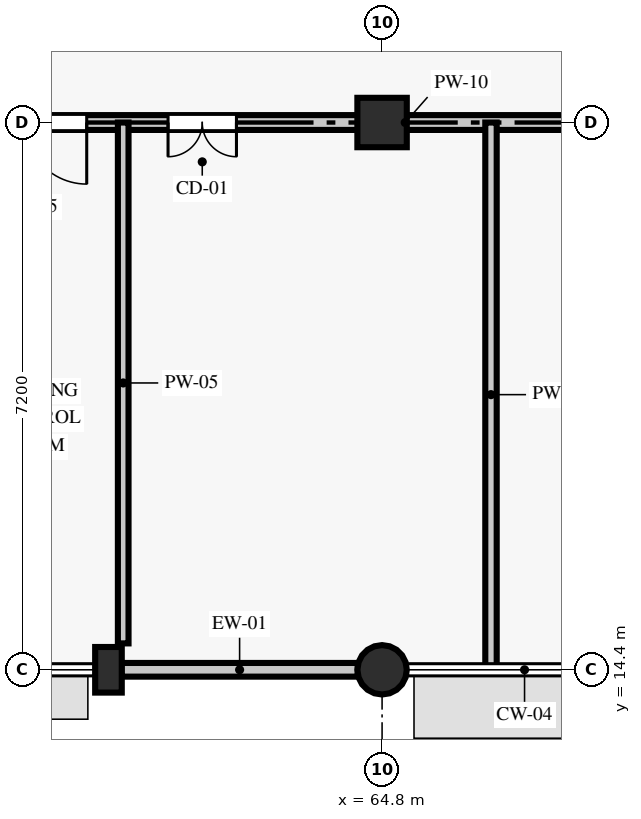
"""IFC4 building model, lengths in metres.
Left out: names, types, materials, properties, quantities, classifications, styles, units other than length and angle.
Written with IfcOpenShell. Run it as: python <this file> out.ifc"""

import sys

from ifc_helpers import new_model, si_unit, direction, frame, frame_2d, origin, origin_2d, place, context, subcontext, project, spatial, rectangle, circle, extrude, element, fill, save


model = new_model("IFC4")
c1 = context("Model", 3, precision=1e-05, world=origin(), true_north=direction((0.0, 1.0)))
c2 = subcontext(c1, "Body", "Model", "MODEL_VIEW")
j1 = project(units=[si_unit("LENGTHUNIT", "METRE"), si_unit("PLANEANGLEUNIT", "RADIAN")], contexts=[c1])
p1 = place(None, origin())
s1 = spatial("IfcSite", under=j1, at=p1, CompositionType="ELEMENT")
p2 = place(p1, origin())
s2 = spatial("IfcBuilding", under=s1, at=p2, CompositionType="ELEMENT")
p3 = place(p2, frame((0.0, 0.0, 4.8)))
s3 = spatial("IfcBuildingStorey", under=s2, at=p3, CompositionType="ELEMENT", Elevation=4.8)
p4 = place(p3, frame((64.8, 14.4, 0.0), z_axis=(0.0, 0.0, 1.0), x_axis=(1.0, 0.0, 0.0)))
e1 = element("IfcColumn", 1, at=p4, inside=s3, PredefinedType="COLUMN", context=c2, shape_type="SweptSolid", body=[
    extrude(circle(Radius=0.325, at=origin_2d()), origin(), (0.0, 0.0, 1.0), 4.505),
])
p5 = place(p3, frame((64.8, 21.6, 0.0), z_axis=(0.0, 0.0, 1.0), x_axis=(1.0, 0.0, 0.0)))
e2 = element("IfcColumn", 2, at=p5, inside=s3, PredefinedType="COLUMN", context=c2, shape_type="SweptSolid", body=[
    extrude(rectangle(XDim=0.65, YDim=0.65, at=origin_2d()), origin(), (0.0, 0.0, 1.0), 4.505),
])
p6 = place(p3, frame((61.2, 14.4, 0.0), z_axis=(0.0, 0.0, 1.0), x_axis=(1.0, 0.0, 0.0)))
e3 = element("IfcColumn", 3, at=p6, inside=s3, PredefinedType="PILASTER", context=c2, shape_type="SweptSolid", body=[
    extrude(rectangle(XDim=0.35, YDim=0.6, at=origin_2d()), origin(), (0.0, 0.0, 1.0), 4.505),
])
p7 = place(p3, frame((61.371, 14.4, 0.0), z_axis=(0.0, 0.0, 1.0), x_axis=(1.0, 0.0, 0.0)))
e4 = element("IfcWall", 4, at=p7, inside=s3, PredefinedType="STANDARD", context=c2, shape_type="SweptSolid", body=[
    extrude(rectangle(XDim=3.109, YDim=0.18, at=frame_2d((1.554, 0.0))), origin(), (0.0, 0.0, 1.0), 3.855),
])
p8 = place(p3, frame((50.725, 21.6, 0.0), z_axis=(0.0, 0.0, 1.0), x_axis=(1.0, 0.0, 0.0)))
e5 = element("IfcWall", 5, at=p8, inside=s3, PredefinedType="PARTITIONING", context=c2, shape_type="SweptSolid", body=[
    extrude(rectangle(XDim=35.35, YDim=0.195, at=frame_2d((17.675, 0.0))), origin(), (0.0, 0.0, 1.0), 3.655),
])
p9 = place(p8, frame((2.752, 0.0, 0.0)))
e6 = element("IfcOpeningElement", 6, at=p9, cuts=e5, PredefinedType="OPENING", context=c2, shape_type="SweptSolid", body=[
    extrude(rectangle(XDim=1.54, YDim=2.2, at=frame_2d((0.77, 1.1))), frame((0.0, 0.107, 0.0), z_axis=(0.0, -1.0, 0.0), x_axis=(1.0, 0.0, 0.0)), (0.0, 0.0, 1.0), 0.215),
])
p10 = place(p8, frame((8.569, 0.0, 0.0)))
e7 = element("IfcOpeningElement", 7, at=p10, cuts=e5, PredefinedType="OPENING", context=c2, shape_type="SweptSolid", body=[
    extrude(rectangle(XDim=1.62, YDim=2.22, at=frame_2d((0.81, 1.11))), frame((0.0, 0.107, 0.0), z_axis=(0.0, -1.0, 0.0), x_axis=(1.0, 0.0, 0.0)), (0.0, 0.0, 1.0), 0.215),
])
p11 = place(p8, frame((11.259, 0.0, 0.0)))
e8 = element("IfcOpeningElement", 8, at=p11, cuts=e5, PredefinedType="OPENING", context=c2, shape_type="SweptSolid", body=[
    extrude(rectangle(XDim=0.9, YDim=2.08, at=frame_2d((0.45, 1.04))), frame((0.0, 0.107, 0.0), z_axis=(0.0, -1.0, 0.0), x_axis=(1.0, 0.0, 0.0)), (0.0, 0.0, 1.0), 0.215),
])
p12 = place(p8, frame((16.6, 0.0, 0.0)))
e9 = element("IfcOpeningElement", 9, at=p12, cuts=e5, PredefinedType="OPENING", context=c2, shape_type="SweptSolid", body=[
    extrude(rectangle(XDim=1.74, YDim=2.26, at=frame_2d((0.87, 1.13))), frame((0.0, 0.107, 0.0), z_axis=(0.0, -1.0, 0.0), x_axis=(1.0, 0.0, 0.0)), (0.0, 0.0, 1.0), 0.215),
])
p13 = place(p8, frame((22.255, 0.0, 0.0)))
e10 = element("IfcOpeningElement", 10, at=p13, cuts=e5, PredefinedType="OPENING", context=c2, shape_type="SweptSolid", body=[
    extrude(rectangle(XDim=0.92, YDim=2.18, at=frame_2d((0.46, 1.09))), frame((0.0, 0.107, 0.0), z_axis=(0.0, -1.0, 0.0), x_axis=(1.0, 0.0, 0.0)), (0.0, 0.0, 1.0), 0.215),
])
p14 = place(p8, frame((24.455, 0.0, 0.0)))
e11 = element("IfcOpeningElement", 11, at=p14, cuts=e5, PredefinedType="OPENING", context=c2, shape_type="SweptSolid", body=[
    extrude(rectangle(XDim=0.94, YDim=2.08, at=frame_2d((0.47, 1.04))), frame((0.0, 0.107, 0.0), z_axis=(0.0, -1.0, 0.0), x_axis=(1.0, 0.0, 0.0)), (0.0, 0.0, 1.0), 0.215),
])
p15 = place(p8, frame((26.745, 0.0, 0.0)))
e12 = element("IfcOpeningElement", 12, at=p15, cuts=e5, PredefinedType="OPENING", context=c2, shape_type="SweptSolid", body=[
    extrude(rectangle(XDim=0.9, YDim=2.08, at=frame_2d((0.45, 1.04))), frame((0.0, 0.107, 0.0), z_axis=(0.0, -1.0, 0.0), x_axis=(1.0, 0.0, 0.0)), (0.0, 0.0, 1.0), 0.215),
])
p16 = place(p8, frame((31.123, 0.0, 0.0)))
e13 = element("IfcOpeningElement", 13, at=p16, cuts=e5, PredefinedType="OPENING", context=c2, shape_type="SweptSolid", body=[
    extrude(rectangle(XDim=1.82, YDim=2.26, at=frame_2d((0.91, 1.13))), frame((0.0, 0.107, 0.0), z_axis=(0.0, -1.0, 0.0), x_axis=(1.0, 0.0, 0.0)), (0.0, 0.0, 1.0), 0.215),
])
p17 = place(p3, frame((61.394, 14.747, 0.0), z_axis=(0.0, 0.0, 1.0), x_axis=(0.0, 1.0, 0.0)))
e14 = element("IfcWall", 14, at=p17, inside=s3, PredefinedType="PARTITIONING", context=c2, shape_type="SweptSolid", body=[
    extrude(rectangle(XDim=6.853, YDim=0.14, at=frame_2d((3.426, 0.0))), origin(), (0.0, 0.0, 1.0), 3.655),
])
p18 = place(p3, frame((66.233, 14.44, 0.0), z_axis=(0.0, 0.0, 1.0), x_axis=(0.0, 1.0, 0.0)))
e15 = element("IfcWall", 15, at=p18, inside=s3, PredefinedType="PARTITIONING", context=c2, shape_type="SweptSolid", body=[
    extrude(rectangle(XDim=7.16, YDim=0.15, at=frame_2d((3.58, 0.0))), origin(), (0.0, 0.0, 1.0), 3.655),
])
p19 = place(p10, frame((1.62, 0.0, 0.0), z_axis=(0.0, 0.0, 1.0), x_axis=(-1.0, 0.0, 0.0)))
e16 = element("IfcDoor", 16, at=p19, inside=s3, OperationType="DOUBLE_DOOR_SINGLE_SWING", PredefinedType="DOOR", context=c2, shape_type="SweptSolid", body=[
    extrude(rectangle(XDim=1.62, YDim=2.22, at=frame_2d((0.81, 1.11))), frame((0.0, 0.025, 0.0), z_axis=(0.0, -1.0, 0.0), x_axis=(1.0, 0.0, 0.0)), (0.0, 0.0, 1.0), 0.05),
])
fill(e7, e16)
p20 = place(p11, frame((0.9, 0.0, 0.0), z_axis=(0.0, 0.0, 1.0), x_axis=(-1.0, 0.0, 0.0)))
e17 = element("IfcDoor", 17, at=p20, inside=s3, OperationType="DOUBLE_DOOR_SINGLE_SWING", PredefinedType="DOOR", context=c2, shape_type="SweptSolid", body=[
    extrude(rectangle(XDim=0.9, YDim=2.08, at=frame_2d((0.45, 1.04))), frame((0.0, 0.025, 0.0), z_axis=(0.0, -1.0, 0.0), x_axis=(1.0, 0.0, 0.0)), (0.0, 0.0, 1.0), 0.05),
])
fill(e8, e17)
save(model, sys.argv[1])
